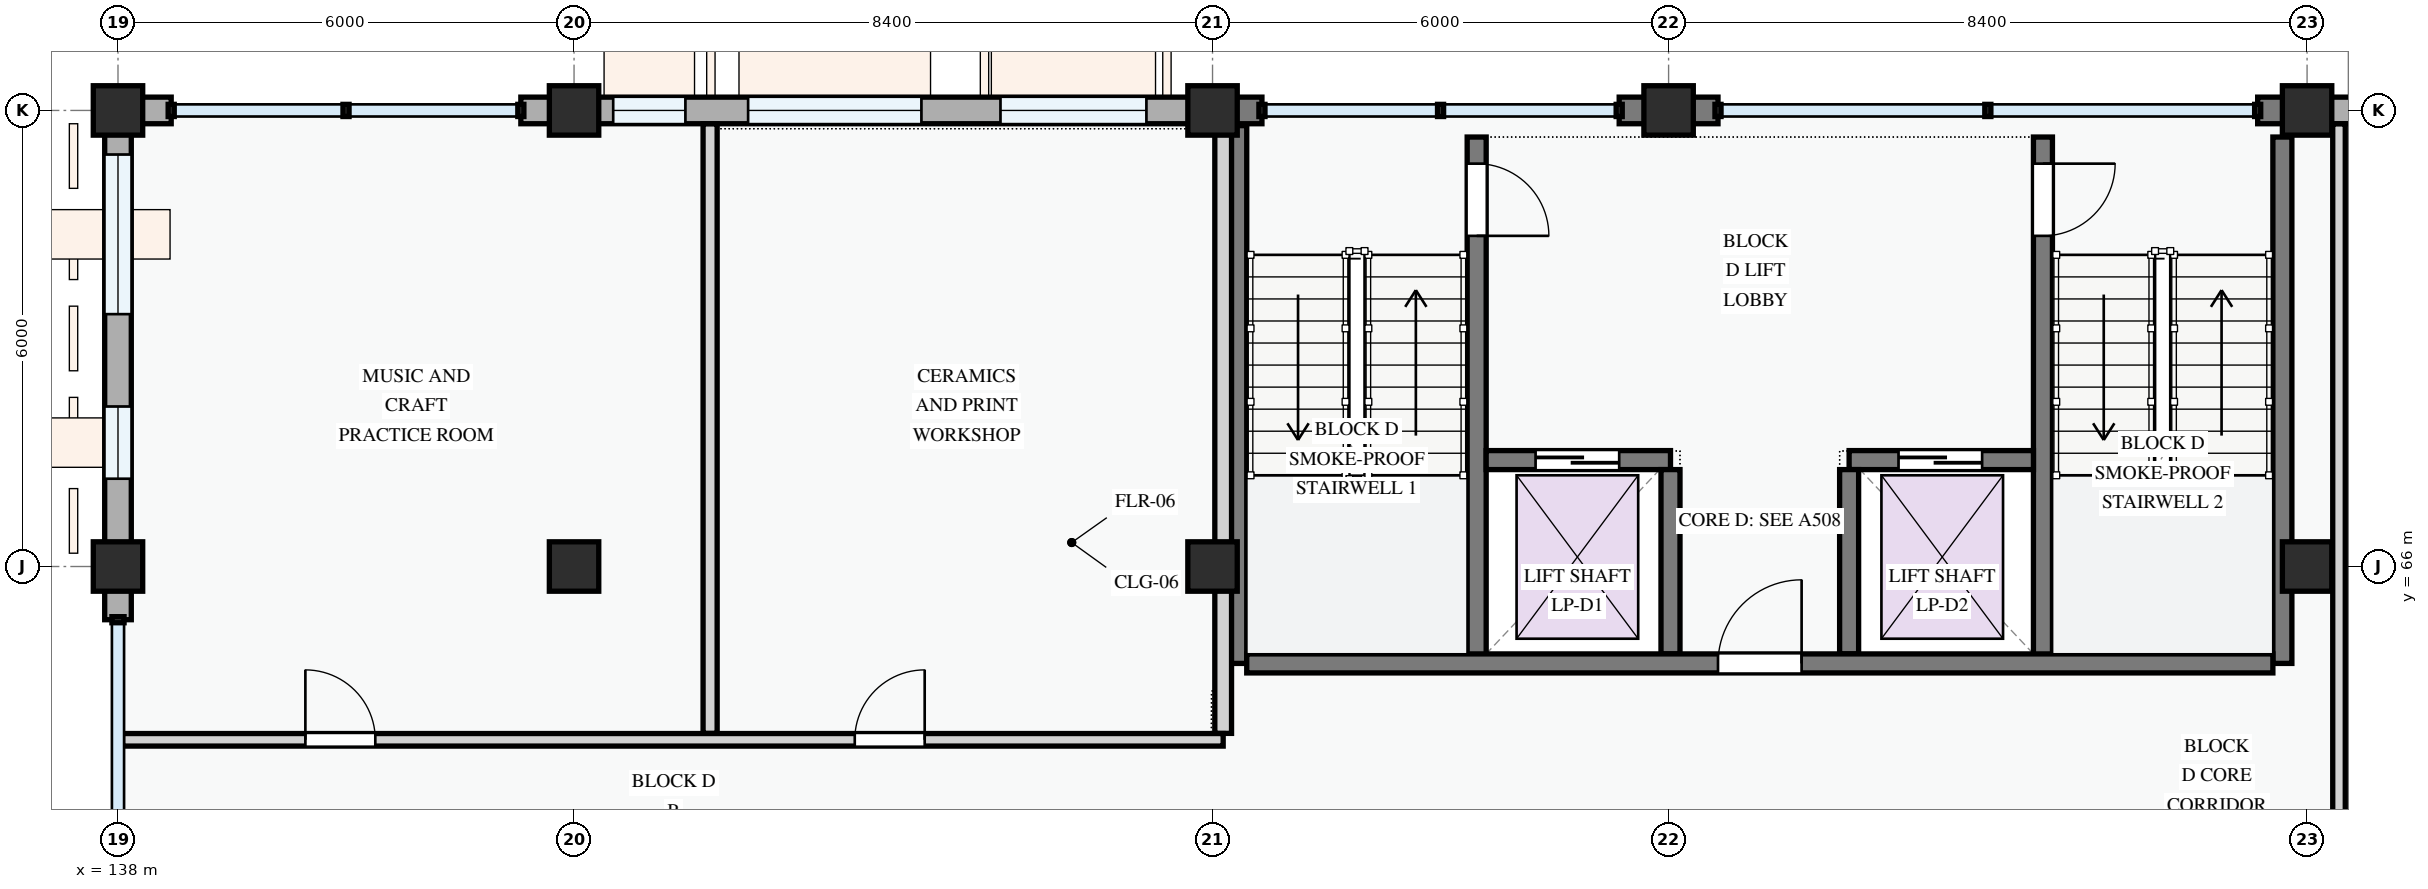
"""IFC4 building model, lengths in metres.
Left out: names, types, materials, properties, quantities, classifications, styles, units other than length and angle.
Written with IfcOpenShell. Run it as: python <this file> out.ifc"""

import sys

from ifc_helpers import new_model, si_unit, direction, frame, frame_2d, origin, origin_2d, place, context, subcontext, project, spatial, rectangle, extrude, element, fill, save


model = new_model("IFC4")
c1 = context("Model", 3, precision=1e-05, world=origin(), true_north=direction((0.0, 1.0)))
c2 = subcontext(c1, "Body", "Model", "MODEL_VIEW")
j1 = project(units=[si_unit("LENGTHUNIT", "METRE"), si_unit("PLANEANGLEUNIT", "RADIAN")], contexts=[c1])
p1 = place(None, origin())
s1 = spatial("IfcSite", under=j1, at=p1, CompositionType="ELEMENT")
p2 = place(p1, origin())
s2 = spatial("IfcBuilding", under=s1, at=p2, CompositionType="ELEMENT")
p3 = place(p2, frame((0.0, 0.0, 4.5)))
s3 = spatial("IfcBuildingStorey", under=s2, at=p3, CompositionType="ELEMENT", Elevation=4.5)
for number, where, z_axis, x_axis in (
    (1, (138.0, 66.0, 0.0), (0.0, 0.0, 1.0), (1.0, 0.0, 0.0)),
    (2, (138.0, 72.0, 0.0), (0.0, 0.0, 1.0), (1.0, 0.0, 0.0)),
    (3, (144.0, 66.0, 0.0), (0.0, 0.0, 1.0), (1.0, 0.0, 0.0)),
    (4, (144.0, 72.0, 0.0), (0.0, 0.0, 1.0), (1.0, 0.0, 0.0)),
    (5, (152.4, 66.0, 0.0), (0.0, 0.0, 1.0), (1.0, 0.0, 0.0)),
    (6, (152.4, 72.0, 0.0), (0.0, 0.0, 1.0), (1.0, 0.0, 0.0)),
    (7, (158.4, 72.0, 0.0), (0.0, 0.0, 1.0), (1.0, 0.0, 0.0)),
    (8, (166.8, 66.0, 0.0), (0.0, 0.0, 1.0), (1.0, 0.0, 0.0)),
    (9, (166.8, 72.0, 0.0), (0.0, 0.0, 1.0), (1.0, 0.0, 0.0)),
):
    element("IfcColumn", number, at=place(p3, frame(where, z_axis=z_axis, x_axis=x_axis)), inside=s3, PredefinedType="COLUMN", context=c2, shape_type="SweptSolid", body=[
        extrude(rectangle(XDim=0.65, YDim=0.65, at=origin_2d()), origin(), (0.0, 0.0, 1.0), 3.6),
    ])
p4 = place(p3, frame((152.4, 72.0, 0.0), z_axis=(0.0, 0.0, 1.0), x_axis=(-1.0, 0.0, 0.0)))
e10 = element("IfcWall", 10, at=p4, inside=s3, PredefinedType="STANDARD", context=c2, shape_type="SweptSolid", body=[
    extrude(rectangle(XDim=8.4, YDim=0.35, at=frame_2d((4.2, 0.0))), origin(), (0.0, 0.0, 1.0), 2.675),
])
p5 = place(p4, frame((0.87, 0.0, 0.78)))
e11 = element("IfcOpeningElement", 11, at=p5, cuts=e10, PredefinedType="OPENING", context=c2, shape_type="SweptSolid", body=[
    extrude(rectangle(XDim=1.92, YDim=1.44, at=frame_2d((0.96, 0.72))), frame((0.0, 0.185, 0.0), z_axis=(0.0, -1.0, 0.0), x_axis=(1.0, 0.0, 0.0)), (0.0, 0.0, 1.0), 0.37),
])
p6 = place(p4, frame((3.83, 0.0, 0.78)))
e12 = element("IfcOpeningElement", 12, at=p6, cuts=e10, PredefinedType="OPENING", context=c2, shape_type="SweptSolid", body=[
    extrude(rectangle(XDim=2.28, YDim=1.46, at=frame_2d((1.14, 0.73))), frame((0.0, 0.185, 0.0), z_axis=(0.0, -1.0, 0.0), x_axis=(1.0, 0.0, 0.0)), (0.0, 0.0, 1.0), 0.37),
])
p7 = place(p4, frame((6.935, 0.0, 0.78)))
e13 = element("IfcOpeningElement", 13, at=p7, cuts=e10, PredefinedType="OPENING", context=c2, shape_type="SweptSolid", body=[
    extrude(rectangle(XDim=0.95, YDim=1.15, at=frame_2d((0.475, 0.575))), frame((0.0, 0.185, 0.0), z_axis=(0.0, -1.0, 0.0), x_axis=(1.0, 0.0, 0.0)), (0.0, 0.0, 1.0), 0.37),
])
p8 = place(p3, frame((144.0, 72.0, 0.0), z_axis=(0.0, 0.0, 1.0), x_axis=(-1.0, 0.0, 0.0)))
e14 = element("IfcWall", 14, at=p8, inside=s3, PredefinedType="STANDARD", context=c2, shape_type="SweptSolid", body=[
    extrude(rectangle(XDim=0.7, YDim=0.35, at=frame_2d((0.35, 0.0))), origin(), (0.0, 0.0, 1.0), 2.775),
])
p9 = place(p3, frame((138.7, 72.0, 0.0), z_axis=(0.0, 0.0, 1.0), x_axis=(-1.0, 0.0, 0.0)))
e15 = element("IfcWall", 15, at=p9, inside=s3, PredefinedType="STANDARD", context=c2, shape_type="SweptSolid", body=[
    extrude(rectangle(XDim=0.523, YDim=0.35, at=frame_2d((0.261, 0.0))), origin(), (0.0, 0.0, 1.0), 2.775),
])
p10 = place(p3, frame((138.0, 72.0, 0.0), z_axis=(0.0, 0.0, 1.0), x_axis=(0.0, -1.0, 0.0)))
e16 = element("IfcWall", 16, at=p10, inside=s3, PredefinedType="STANDARD", context=c2, shape_type="SweptSolid", body=[
    extrude(rectangle(XDim=6.0, YDim=0.35, at=frame_2d((3.0, 0.0))), origin(), (0.0, 0.0, 1.0), 2.875),
])
p11 = place(p10, frame((0.58, 0.0, 0.78)))
e17 = element("IfcOpeningElement", 17, at=p11, cuts=e16, PredefinedType="OPENING", context=c2, shape_type="SweptSolid", body=[
    extrude(rectangle(XDim=2.1, YDim=1.55, at=frame_2d((1.05, 0.775))), frame((0.0, 0.185, 0.0), z_axis=(0.0, -1.0, 0.0), x_axis=(1.0, 0.0, 0.0)), (0.0, 0.0, 1.0), 0.37),
])
p12 = place(p10, frame((3.895, 0.0, 0.78)))
e18 = element("IfcOpeningElement", 18, at=p12, cuts=e16, PredefinedType="OPENING", context=c2, shape_type="SweptSolid", body=[
    extrude(rectangle(XDim=0.95, YDim=1.15, at=frame_2d((0.475, 0.575))), frame((0.0, 0.185, 0.0), z_axis=(0.0, -1.0, 0.0), x_axis=(1.0, 0.0, 0.0)), (0.0, 0.0, 1.0), 0.37),
])
p13 = place(p3, frame((138.0, 66.0, 0.0), z_axis=(0.0, 0.0, 1.0), x_axis=(0.0, -1.0, 0.0)))
e19 = element("IfcWall", 19, at=p13, inside=s3, PredefinedType="STANDARD", context=c2, shape_type="SweptSolid", body=[
    extrude(rectangle(XDim=0.7, YDim=0.35, at=frame_2d((0.35, 0.0))), origin(), (0.0, 0.0, 1.0), 2.725),
])
p14 = place(p3, frame((174.0, 72.0, 0.0), z_axis=(0.0, 0.0, 1.0), x_axis=(-1.0, 0.0, 0.0)))
e20 = element("IfcWall", 20, at=p14, inside=s3, PredefinedType="STANDARD", context=c2, shape_type="SweptSolid", body=[
    extrude(rectangle(XDim=7.2, YDim=0.35, at=frame_2d((3.6, 0.0))), origin(), (0.0, 0.0, 1.0), 2.675),
])
p15 = place(p14, frame((1.272, 0.0, 0.78)))
e21 = element("IfcOpeningElement", 21, at=p15, cuts=e20, PredefinedType="OPENING", context=c2, shape_type="SweptSolid", body=[
    extrude(rectangle(XDim=1.2, YDim=1.35, at=frame_2d((0.6, 0.675))), frame((0.0, 0.185, 0.0), z_axis=(0.0, -1.0, 0.0), x_axis=(1.0, 0.0, 0.0)), (0.0, 0.0, 1.0), 0.37),
])
p16 = place(p14, frame((4.347, 0.0, 0.78)))
e22 = element("IfcOpeningElement", 22, at=p16, cuts=e20, PredefinedType="OPENING", context=c2, shape_type="SweptSolid", body=[
    extrude(rectangle(XDim=1.5, YDim=1.65, at=frame_2d((0.75, 0.825))), frame((0.0, 0.185, 0.0), z_axis=(0.0, -1.0, 0.0), x_axis=(1.0, 0.0, 0.0)), (0.0, 0.0, 1.0), 0.37),
])
for number, where, z_axis, x_axis in (
    (23, (166.8, 72.0, 0.0), (0.0, 0.0, 1.0), (-1.0, 0.0, 0.0)),
    (24, (159.05, 72.0, 0.0), (0.0, 0.0, 1.0), (-1.0, 0.0, 0.0)),
):
    element("IfcWall", number, at=place(p3, frame(where, z_axis=z_axis, x_axis=x_axis)), inside=s3, PredefinedType="STANDARD", context=c2, shape_type="SweptSolid", body=[
        extrude(rectangle(XDim=0.65, YDim=0.35, at=frame_2d((0.325, 0.0))), origin(), (0.0, 0.0, 1.0), 3.34),
    ])
p17 = place(p3, frame((158.4, 72.0, 0.0), z_axis=(0.0, 0.0, 1.0), x_axis=(-1.0, 0.0, 0.0)))
e25 = element("IfcWall", 25, at=p17, inside=s3, PredefinedType="STANDARD", context=c2, shape_type="SweptSolid", body=[
    extrude(rectangle(XDim=0.65, YDim=0.35, at=frame_2d((0.325, 0.0))), origin(), (0.0, 0.0, 1.0), 3.34),
])
p18 = place(p3, frame((153.05, 72.0, 0.0), z_axis=(0.0, 0.0, 1.0), x_axis=(-1.0, 0.0, 0.0)))
e26 = element("IfcWall", 26, at=p18, inside=s3, PredefinedType="STANDARD", context=c2, shape_type="SweptSolid", body=[
    extrude(rectangle(XDim=0.65, YDim=0.35, at=frame_2d((0.325, 0.0))), origin(), (0.0, 0.0, 1.0), 3.34),
])
p19 = place(p3, frame((155.875, 71.65, 0.0), z_axis=(0.0, 0.0, 1.0), x_axis=(0.0, -1.0, 0.0)))
e27 = element("IfcWall", 27, at=p19, inside=s3, PredefinedType="SHEAR", context=c2, shape_type="SweptSolid", body=[
    extrude(rectangle(XDim=6.925, YDim=0.25, at=frame_2d((3.462, 0.0))), origin(), (0.0, 0.0, 1.0), 3.3),
])
p20 = place(p19, frame((0.35, 0.0, 0.0)))
e28 = element("IfcOpeningElement", 28, at=p20, cuts=e27, PredefinedType="OPENING", context=c2, shape_type="SweptSolid", body=[
    extrude(rectangle(XDim=0.95, YDim=2.1, at=frame_2d((0.475, 1.05))), frame((0.0, 0.135, 0.0), z_axis=(0.0, -1.0, 0.0), x_axis=(1.0, 0.0, 0.0)), (0.0, 0.0, 1.0), 0.27),
])
p21 = place(p3, frame((152.725, 71.8, 0.0), z_axis=(0.0, 0.0, 1.0), x_axis=(0.0, -1.0, 0.0)))
e29 = element("IfcWall", 29, at=p21, inside=s3, PredefinedType="SHEAR", context=c2, shape_type="SweptSolid", body=[
    extrude(rectangle(XDim=7.075, YDim=0.25, at=frame_2d((3.538, 0.0))), origin(), (0.0, 0.0, 1.0), 3.3),
])
p22 = place(p3, frame((166.475, 71.65, 0.0), z_axis=(0.0, 0.0, 1.0), x_axis=(0.0, -1.0, 0.0)))
e30 = element("IfcWall", 30, at=p22, inside=s3, PredefinedType="SHEAR", context=c2, shape_type="SweptSolid", body=[
    extrude(rectangle(XDim=6.925, YDim=0.25, at=frame_2d((3.462, 0.0))), origin(), (0.0, 0.0, 1.0), 3.3),
])
p23 = place(p3, frame((163.325, 71.65, 0.0), z_axis=(0.0, 0.0, 1.0), x_axis=(0.0, -1.0, 0.0)))
e31 = element("IfcWall", 31, at=p23, inside=s3, PredefinedType="SHEAR", context=c2, shape_type="SweptSolid", body=[
    extrude(rectangle(XDim=6.925, YDim=0.25, at=frame_2d((3.462, 0.0))), origin(), (0.0, 0.0, 1.0), 3.3),
])
p24 = place(p23, frame((0.35, 0.0, 0.0)))
e32 = element("IfcOpeningElement", 32, at=p24, cuts=e31, PredefinedType="OPENING", context=c2, shape_type="SweptSolid", body=[
    extrude(rectangle(XDim=0.95, YDim=2.1, at=frame_2d((0.475, 1.05))), frame((0.0, 0.135, 0.0), z_axis=(0.0, -1.0, 0.0), x_axis=(1.0, 0.0, 0.0)), (0.0, 0.0, 1.0), 0.27),
])
p25 = place(p3, frame((156.0, 67.4, 0.0), z_axis=(0.0, 0.0, 1.0), x_axis=(1.0, 0.0, 0.0)))
e33 = element("IfcWall", 33, at=p25, inside=s3, PredefinedType="SHEAR", context=c2, shape_type="SweptSolid", body=[
    extrude(rectangle(XDim=2.425, YDim=0.25, at=frame_2d((1.212, 0.0))), origin(), (0.0, 0.0, 1.0), 3.3),
])
p26 = place(p25, frame((0.65, 0.0, 0.0)))
e34 = element("IfcOpeningElement", 34, at=p26, cuts=e33, PredefinedType="OPENING", context=c2, shape_type="SweptSolid", body=[
    extrude(rectangle(XDim=1.1, YDim=2.15, at=frame_2d((0.55, 1.075))), frame((0.0, 0.135, 0.0), z_axis=(0.0, -1.0, 0.0), x_axis=(1.0, 0.0, 0.0)), (0.0, 0.0, 1.0), 0.27),
])
p27 = place(p3, frame((160.775, 67.4, 0.0), z_axis=(0.0, 0.0, 1.0), x_axis=(1.0, 0.0, 0.0)))
e35 = element("IfcWall", 35, at=p27, inside=s3, PredefinedType="SHEAR", context=c2, shape_type="SweptSolid", body=[
    extrude(rectangle(XDim=2.425, YDim=0.25, at=frame_2d((1.212, 0.0))), origin(), (0.0, 0.0, 1.0), 3.3),
])
p28 = place(p27, frame((0.65, 0.0, 0.0)))
e36 = element("IfcOpeningElement", 36, at=p28, cuts=e35, PredefinedType="OPENING", context=c2, shape_type="SweptSolid", body=[
    extrude(rectangle(XDim=1.1, YDim=2.15, at=frame_2d((0.55, 1.075))), frame((0.0, 0.135, 0.0), z_axis=(0.0, -1.0, 0.0), x_axis=(1.0, 0.0, 0.0)), (0.0, 0.0, 1.0), 0.27),
])
for number, where, z_axis, x_axis in (
    (37, (158.425, 67.275, 0.0), (0.0, 0.0, 1.0), (0.0, -1.0, 0.0)),
    (38, (160.775, 67.275, 0.0), (0.0, 0.0, 1.0), (0.0, -1.0, 0.0)),
):
    element("IfcWall", number, at=place(p3, frame(where, z_axis=z_axis, x_axis=x_axis)), inside=s3, PredefinedType="SHEAR", context=c2, shape_type="SweptSolid", body=[
        extrude(rectangle(XDim=2.425, YDim=0.25, at=frame_2d((1.212, 0.0))), origin(), (0.0, 0.0, 1.0), 3.3),
    ])
p29 = place(p3, frame((152.85, 64.725, 0.0), z_axis=(0.0, 0.0, 1.0), x_axis=(1.0, 0.0, 0.0)))
e39 = element("IfcWall", 39, at=p29, inside=s3, PredefinedType="SHEAR", context=c2, shape_type="SweptSolid", body=[
    extrude(rectangle(XDim=13.5, YDim=0.25, at=frame_2d((6.75, 0.0))), origin(), (0.0, 0.0, 1.0), 3.3),
])
p30 = place(p29, frame((6.2, 0.0, 0.0)))
e40 = element("IfcOpeningElement", 40, at=p30, cuts=e39, PredefinedType="OPENING", context=c2, shape_type="SweptSolid", body=[
    extrude(rectangle(XDim=1.1, YDim=2.15, at=frame_2d((0.55, 1.075))), frame((0.0, 0.135, 0.0), z_axis=(0.0, -1.0, 0.0), x_axis=(1.0, 0.0, 0.0)), (0.0, 0.0, 1.0), 0.27),
])
p31 = place(p3, frame((167.22, 57.842, 0.0), z_axis=(0.0, 0.0, 1.0), x_axis=(0.0, 1.0, 0.0)))
e41 = element("IfcWall", 41, at=p31, inside=s3, PredefinedType="PARTITIONING", context=c2, shape_type="SweptSolid", body=[
    extrude(rectangle(XDim=13.981, YDim=0.165, at=frame_2d((6.99, 0.0))), origin(), (0.0, 0.0, 1.0), 2.725),
])
p32 = place(p31, frame((2.448, 0.0, 0.0)))
e42 = element("IfcOpeningElement", 42, at=p32, cuts=e41, PredefinedType="OPENING", context=c2, shape_type="SweptSolid", body=[
    extrude(rectangle(XDim=0.96, YDim=2.12, at=frame_2d((0.48, 1.06))), frame((0.0, 0.093, 0.0), z_axis=(0.0, -1.0, 0.0), x_axis=(1.0, 0.0, 0.0)), (0.0, 0.0, 1.0), 0.185),
])
p33 = place(p3, frame((145.79, 63.804, 0.0), z_axis=(0.0, 0.0, 1.0), x_axis=(0.0, 1.0, 0.0)))
e43 = element("IfcWall", 43, at=p33, inside=s3, PredefinedType="PARTITIONING", context=c2, shape_type="SweptSolid", body=[
    extrude(rectangle(XDim=8.019, YDim=0.185, at=frame_2d((4.009, 0.0))), origin(), (0.0, 0.0, 1.0), 3.3),
])
p34 = place(p3, frame((152.54, 63.804, 0.0), z_axis=(0.0, 0.0, 1.0), x_axis=(0.0, 1.0, 0.0)))
e44 = element("IfcWall", 44, at=p34, inside=s3, PredefinedType="PARTITIONING", context=c2, shape_type="SweptSolid", body=[
    extrude(rectangle(XDim=8.019, YDim=0.22, at=frame_2d((4.009, 0.0))), origin(), (0.0, 0.0, 1.0), 2.725),
])
p35 = place(p3, frame((138.06, 63.72, 0.0), z_axis=(0.0, 0.0, 1.0), x_axis=(1.0, 0.0, 0.0)))
e45 = element("IfcWall", 45, at=p35, inside=s3, PredefinedType="PARTITIONING", context=c2, shape_type="SweptSolid", body=[
    extrude(rectangle(XDim=14.48, YDim=0.165, at=frame_2d((7.24, 0.0))), origin(), (0.0, 0.0, 1.0), 3.3),
])
p36 = place(p35, frame((2.405, 0.0, 0.0)))
e46 = element("IfcOpeningElement", 46, at=p36, cuts=e45, PredefinedType="OPENING", context=c2, shape_type="SweptSolid", body=[
    extrude(rectangle(XDim=0.92, YDim=2.1, at=frame_2d((0.46, 1.05))), frame((0.0, 0.093, 0.0), z_axis=(0.0, -1.0, 0.0), x_axis=(1.0, 0.0, 0.0)), (0.0, 0.0, 1.0), 0.185),
])
p37 = place(p35, frame((9.633, 0.0, 0.0)))
e47 = element("IfcOpeningElement", 47, at=p37, cuts=e45, PredefinedType="OPENING", context=c2, shape_type="SweptSolid", body=[
    extrude(rectangle(XDim=0.92, YDim=2.1, at=frame_2d((0.46, 1.05))), frame((0.0, 0.093, 0.0), z_axis=(0.0, -1.0, 0.0), x_axis=(1.0, 0.0, 0.0)), (0.0, 0.0, 1.0), 0.185),
])
p38 = place(p5, origin())
e48 = element("IfcWindow", 48, at=p38, inside=s3, PartitioningType="DOUBLE_PANEL_VERTICAL", PredefinedType="WINDOW", context=c2, shape_type="SweptSolid", body=[
    extrude(rectangle(XDim=1.92, YDim=1.44, at=frame_2d((0.96, 0.72))), frame((0.0, 0.03, 0.0), z_axis=(0.0, -1.0, 0.0), x_axis=(1.0, 0.0, 0.0)), (0.0, 0.0, 1.0), 0.06),
])
fill(e11, e48)
p39 = place(p6, origin())
e49 = element("IfcWindow", 49, at=p39, inside=s3, PartitioningType="DOUBLE_PANEL_VERTICAL", PredefinedType="WINDOW", context=c2, shape_type="SweptSolid", body=[
    extrude(rectangle(XDim=2.28, YDim=1.46, at=frame_2d((1.14, 0.73))), frame((0.0, 0.03, 0.0), z_axis=(0.0, -1.0, 0.0), x_axis=(1.0, 0.0, 0.0)), (0.0, 0.0, 1.0), 0.06),
])
fill(e12, e49)
p40 = place(p7, origin())
e50 = element("IfcWindow", 50, at=p40, inside=s3, PartitioningType="SINGLE_PANEL", PredefinedType="WINDOW", context=c2, shape_type="SweptSolid", body=[
    extrude(rectangle(XDim=0.95, YDim=1.15, at=frame_2d((0.475, 0.575))), frame((0.0, 0.03, 0.0), z_axis=(0.0, -1.0, 0.0), x_axis=(1.0, 0.0, 0.0)), (0.0, 0.0, 1.0), 0.06),
])
fill(e13, e50)
p41 = place(p11, origin())
e51 = element("IfcWindow", 51, at=p41, inside=s3, PartitioningType="DOUBLE_PANEL_VERTICAL", PredefinedType="WINDOW", context=c2, shape_type="SweptSolid", body=[
    extrude(rectangle(XDim=2.1, YDim=1.55, at=frame_2d((1.05, 0.775))), frame((0.0, 0.03, 0.0), z_axis=(0.0, -1.0, 0.0), x_axis=(1.0, 0.0, 0.0)), (0.0, 0.0, 1.0), 0.06),
])
fill(e17, e51)
p42 = place(p12, origin())
e52 = element("IfcWindow", 52, at=p42, inside=s3, PartitioningType="SINGLE_PANEL", PredefinedType="WINDOW", context=c2, shape_type="SweptSolid", body=[
    extrude(rectangle(XDim=0.95, YDim=1.15, at=frame_2d((0.475, 0.575))), frame((0.0, 0.03, 0.0), z_axis=(0.0, -1.0, 0.0), x_axis=(1.0, 0.0, 0.0)), (0.0, 0.0, 1.0), 0.06),
])
fill(e18, e52)
p43 = place(p20, origin())
e53 = element("IfcDoor", 53, at=p43, inside=s3, OperationType="SINGLE_SWING_RIGHT", PredefinedType="DOOR", context=c2, shape_type="SweptSolid", body=[
    extrude(rectangle(XDim=0.95, YDim=2.1, at=frame_2d((0.475, 1.05))), frame((0.0, 0.025, 0.0), z_axis=(0.0, -1.0, 0.0), x_axis=(1.0, 0.0, 0.0)), (0.0, 0.0, 1.0), 0.05),
])
fill(e28, e53)
p44 = place(p24, origin())
e54 = element("IfcDoor", 54, at=p44, inside=s3, OperationType="SINGLE_SWING_LEFT", PredefinedType="DOOR", context=c2, shape_type="SweptSolid", body=[
    extrude(rectangle(XDim=0.95, YDim=2.1, at=frame_2d((0.475, 1.05))), frame((0.0, 0.025, 0.0), z_axis=(0.0, -1.0, 0.0), x_axis=(1.0, 0.0, 0.0)), (0.0, 0.0, 1.0), 0.05),
])
fill(e32, e54)
p45 = place(p26, origin())
e55 = element("IfcDoor", 55, at=p45, inside=s3, OperationType="SLIDING_TO_LEFT", PredefinedType="DOOR", context=c2, shape_type="SweptSolid", body=[
    extrude(rectangle(XDim=1.1, YDim=2.15, at=frame_2d((0.55, 1.075))), frame((0.0, 0.025, 0.0), z_axis=(0.0, -1.0, 0.0), x_axis=(1.0, 0.0, 0.0)), (0.0, 0.0, 1.0), 0.05),
])
fill(e34, e55)
p46 = place(p28, origin())
e56 = element("IfcDoor", 56, at=p46, inside=s3, OperationType="SLIDING_TO_LEFT", PredefinedType="DOOR", context=c2, shape_type="SweptSolid", body=[
    extrude(rectangle(XDim=1.1, YDim=2.15, at=frame_2d((0.55, 1.075))), frame((0.0, 0.025, 0.0), z_axis=(0.0, -1.0, 0.0), x_axis=(1.0, 0.0, 0.0)), (0.0, 0.0, 1.0), 0.05),
])
fill(e36, e56)
p47 = place(p30, origin())
e57 = element("IfcDoor", 57, at=p47, inside=s3, OperationType="SINGLE_SWING_RIGHT", PredefinedType="DOOR", context=c2, shape_type="SweptSolid", body=[
    extrude(rectangle(XDim=1.1, YDim=2.15, at=frame_2d((0.55, 1.075))), frame((0.0, 0.025, 0.0), z_axis=(0.0, -1.0, 0.0), x_axis=(1.0, 0.0, 0.0)), (0.0, 0.0, 1.0), 0.05),
])
fill(e40, e57)
p48 = place(p36, origin())
e58 = element("IfcDoor", 58, at=p48, inside=s3, OperationType="SINGLE_SWING_LEFT", PredefinedType="DOOR", context=c2, shape_type="SweptSolid", body=[
    extrude(rectangle(XDim=0.92, YDim=2.1, at=frame_2d((0.46, 1.05))), frame((0.0, 0.025, 0.0), z_axis=(0.0, -1.0, 0.0), x_axis=(1.0, 0.0, 0.0)), (0.0, 0.0, 1.0), 0.05),
])
fill(e46, e58)
p49 = place(p37, origin())
e59 = element("IfcDoor", 59, at=p49, inside=s3, OperationType="SINGLE_SWING_RIGHT", PredefinedType="DOOR", context=c2, shape_type="SweptSolid", body=[
    extrude(rectangle(XDim=0.92, YDim=2.1, at=frame_2d((0.46, 1.05))), frame((0.0, 0.025, 0.0), z_axis=(0.0, -1.0, 0.0), x_axis=(1.0, 0.0, 0.0)), (0.0, 0.0, 1.0), 0.05),
])
fill(e47, e59)
save(model, sys.argv[1])
